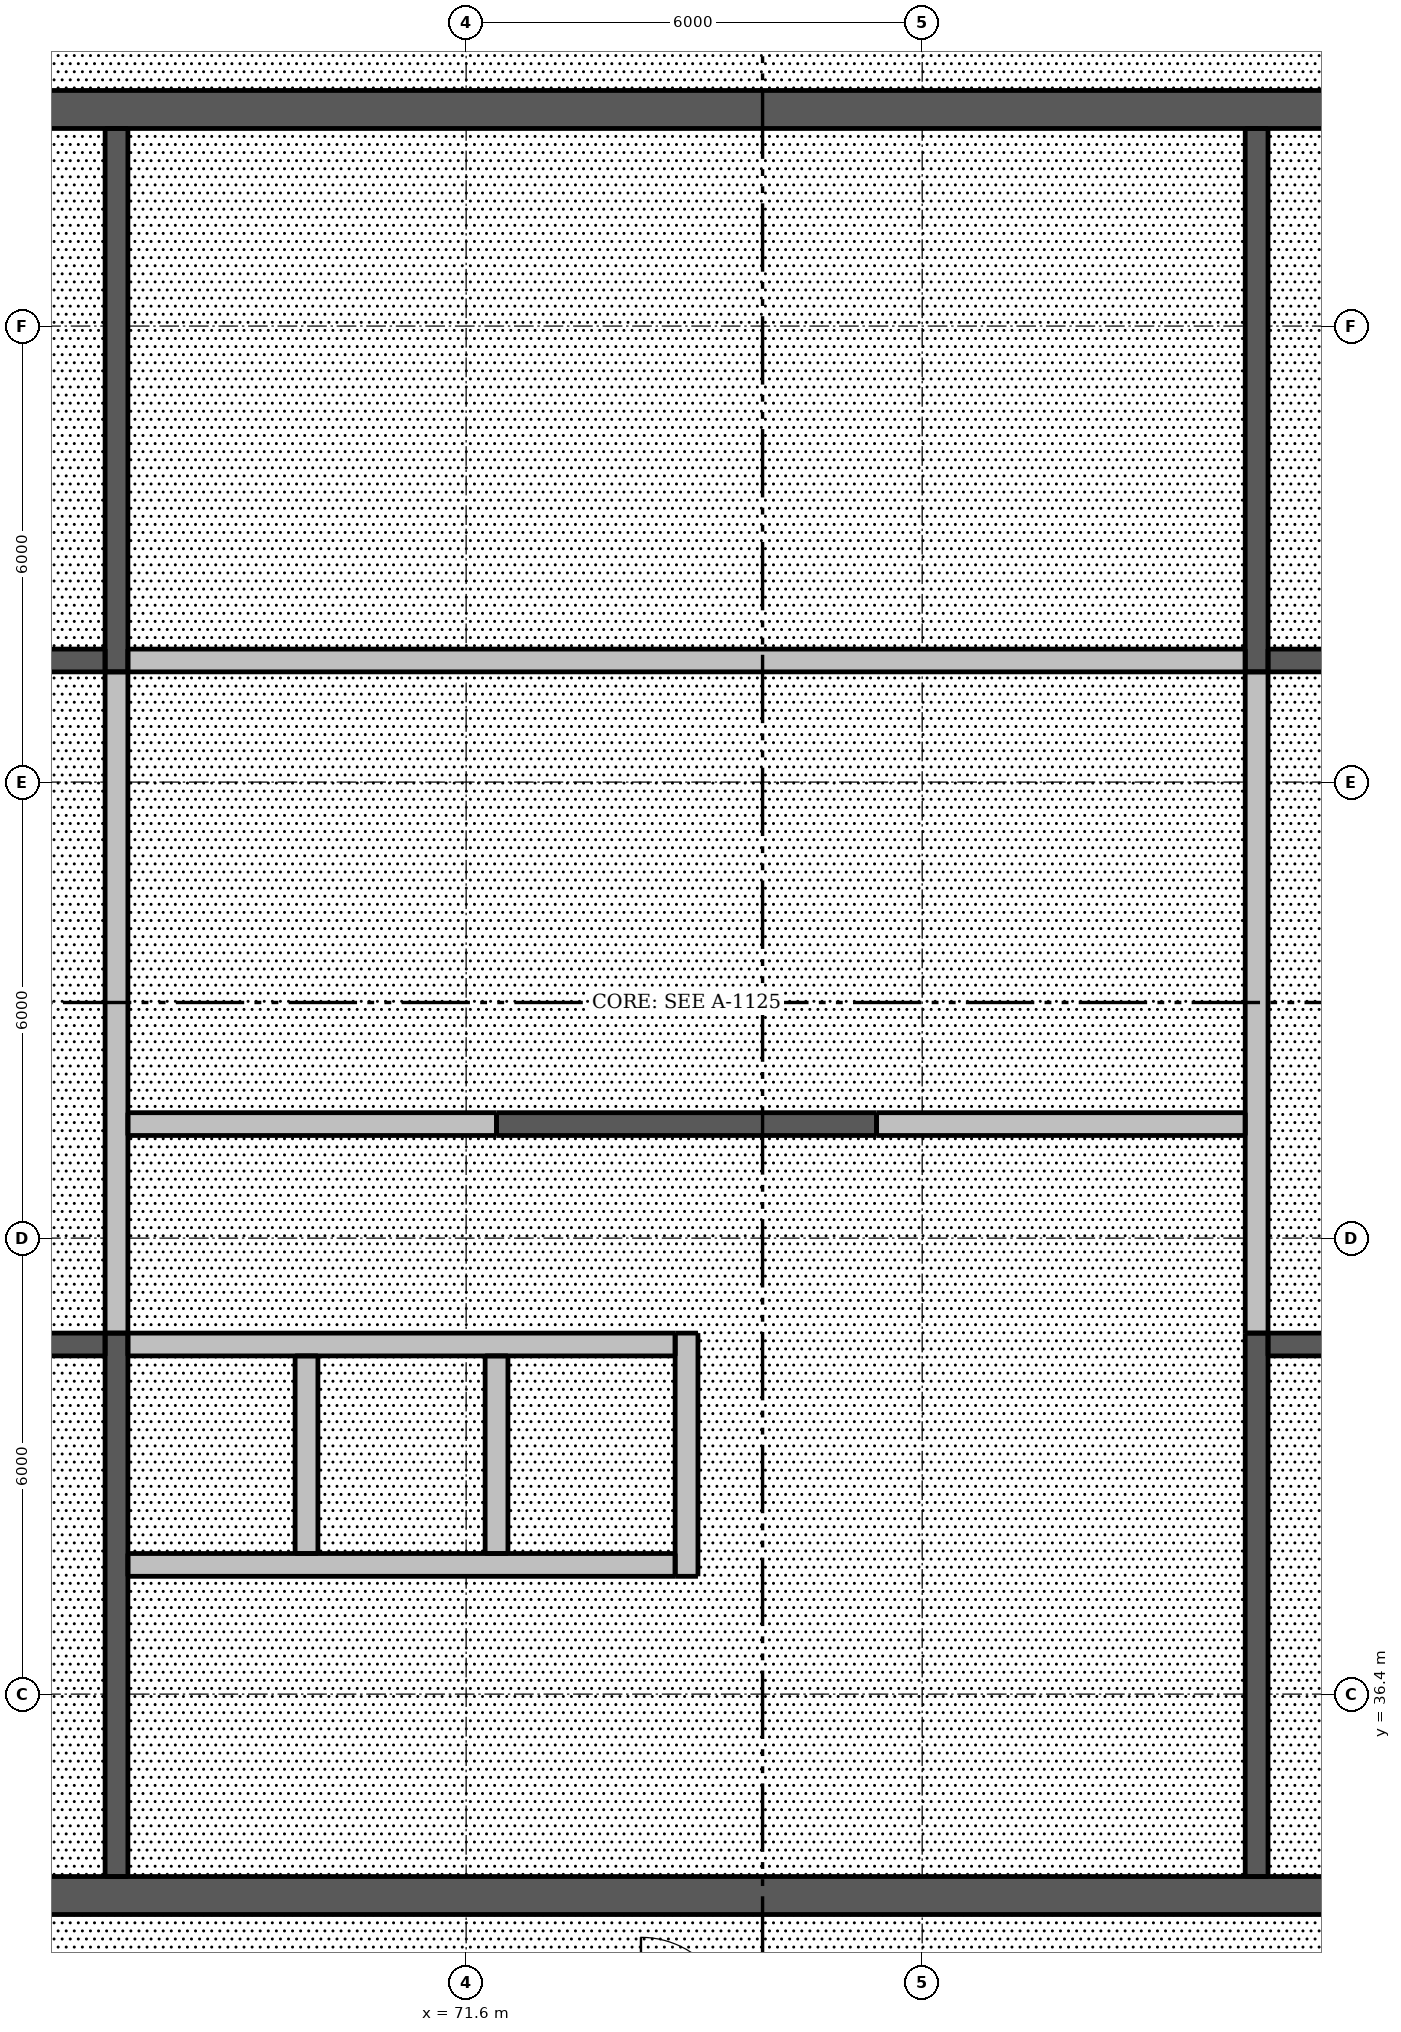
"""IFC4 building model, lengths in metres.
Left out: names, types, materials, properties, quantities, classifications, styles, units other than length and angle.
Written with IfcOpenShell. Run it as: python <this file> out.ifc"""

import sys

from ifc_helpers import new_model, si_unit, direction, frame, frame_2d, origin, place, context, subcontext, project, spatial, rectangle, extrude, element, fill, save


model = new_model("IFC4")
c1 = context("Model", 3, precision=1e-05, world=origin(), true_north=direction((0.0, 1.0)))
c2 = subcontext(c1, "Body", "Model", "MODEL_VIEW")
j1 = project(units=[si_unit("LENGTHUNIT", "METRE"), si_unit("PLANEANGLEUNIT", "RADIAN")], contexts=[c1])
p1 = place(None, origin())
s1 = spatial("IfcSite", under=j1, at=p1, CompositionType="ELEMENT")
p2 = place(p1, origin())
s2 = spatial("IfcBuilding", under=s1, at=p2, CompositionType="ELEMENT")
p3 = place(p2, frame((0.0, 0.0, 294.4)))
s3 = spatial("IfcBuildingStorey", under=s2, at=p3, CompositionType="ELEMENT", Elevation=294.4)
p4 = place(p3, frame((62.5, 33.75, 0.0), z_axis=(0.0, 0.0, 1.0), x_axis=(1.0, 0.0, 0.0)))
e1 = element("IfcWall", 1, at=p4, inside=s3, PredefinedType="SHEAR", context=c2, shape_type="SweptSolid", body=[
    extrude(rectangle(XDim=24.0, YDim=0.5, at=frame_2d((12.0, 0.0))), origin(), (0.0, 0.0, 1.0), 3.3),
])
p5 = place(p4, frame((1.875, 0.0, 0.0)))
e2 = element("IfcOpeningElement", 2, at=p5, cuts=e1, PredefinedType="OPENING", context=c2, shape_type="SweptSolid", body=[
    extrude(rectangle(XDim=1.1, YDim=2.1, at=frame_2d((0.55, 1.05))), frame((0.0, 0.26, 0.0), z_axis=(0.0, -1.0, 0.0), x_axis=(1.0, 0.0, 0.0)), (0.0, 0.0, 1.0), 0.52),
])
p6 = place(p4, frame((21.025, 0.0, 0.0)))
e3 = element("IfcOpeningElement", 3, at=p6, cuts=e1, PredefinedType="OPENING", context=c2, shape_type="SweptSolid", body=[
    extrude(rectangle(XDim=1.1, YDim=2.1, at=frame_2d((0.55, 1.05))), frame((0.0, 0.26, 0.0), z_axis=(0.0, -1.0, 0.0), x_axis=(1.0, 0.0, 0.0)), (0.0, 0.0, 1.0), 0.52),
])
p7 = place(p4, frame((11.55, 0.0, 0.0)))
e4 = element("IfcOpeningElement", 4, at=p7, cuts=e1, PredefinedType="OPENING", context=c2, shape_type="SweptSolid", body=[
    extrude(rectangle(XDim=0.9, YDim=2.1, at=frame_2d((0.45, 1.05))), frame((0.0, 0.26, 0.0), z_axis=(0.0, -1.0, 0.0), x_axis=(1.0, 0.0, 0.0)), (0.0, 0.0, 1.0), 0.52),
])
p8 = place(p3, frame((62.5, 57.25, 0.0), z_axis=(0.0, 0.0, 1.0), x_axis=(1.0, 0.0, 0.0)))
e5 = element("IfcWall", 5, at=p8, inside=s3, PredefinedType="SHEAR", context=c2, shape_type="SweptSolid", body=[
    extrude(rectangle(XDim=24.0, YDim=0.5, at=frame_2d((12.0, 0.0))), origin(), (0.0, 0.0, 1.0), 3.3),
])
p9 = place(p8, frame((21.025, 0.0, 0.0)))
e6 = element("IfcOpeningElement", 6, at=p9, cuts=e5, PredefinedType="OPENING", context=c2, shape_type="SweptSolid", body=[
    extrude(rectangle(XDim=1.1, YDim=2.1, at=frame_2d((0.55, 1.05))), frame((0.0, 0.26, 0.0), z_axis=(0.0, -1.0, 0.0), x_axis=(1.0, 0.0, 0.0)), (0.0, 0.0, 1.0), 0.52),
])
p10 = place(p8, frame((1.875, 0.0, 0.0)))
e7 = element("IfcOpeningElement", 7, at=p10, cuts=e5, PredefinedType="OPENING", context=c2, shape_type="SweptSolid", body=[
    extrude(rectangle(XDim=1.1, YDim=2.1, at=frame_2d((0.55, 1.05))), frame((0.0, 0.26, 0.0), z_axis=(0.0, -1.0, 0.0), x_axis=(1.0, 0.0, 0.0)), (0.0, 0.0, 1.0), 0.52),
])
p11 = place(p8, frame((11.55, 0.0, 0.0)))
e8 = element("IfcOpeningElement", 8, at=p11, cuts=e5, PredefinedType="OPENING", context=c2, shape_type="SweptSolid", body=[
    extrude(rectangle(XDim=0.9, YDim=2.1, at=frame_2d((0.45, 1.05))), frame((0.0, 0.26, 0.0), z_axis=(0.0, -1.0, 0.0), x_axis=(1.0, 0.0, 0.0)), (0.0, 0.0, 1.0), 0.52),
])
p12 = place(p3, frame((72.0, 43.9, 0.0), z_axis=(0.0, 0.0, 1.0), x_axis=(1.0, 0.0, 0.0)))
e9 = element("IfcWall", 9, at=p12, inside=s3, PredefinedType="SHEAR", context=c2, shape_type="SweptSolid", body=[
    extrude(rectangle(XDim=5.0, YDim=0.3, at=frame_2d((2.5, 0.0))), origin(), (0.0, 0.0, 1.0), 3.3),
])
p13 = place(p3, frame((67.0, 34.0, 0.0), z_axis=(0.0, 0.0, 1.0), x_axis=(0.0, 1.0, 0.0)))
e10 = element("IfcWall", 10, at=p13, inside=s3, PredefinedType="SHEAR", context=c2, shape_type="SweptSolid", body=[
    extrude(rectangle(XDim=7.15, YDim=0.3, at=frame_2d((3.575, 0.0))), origin(), (0.0, 0.0, 1.0), 3.3),
])
p14 = place(p13, frame((0.2, 0.0, 0.0)))
e11 = element("IfcOpeningElement", 11, at=p14, cuts=e10, PredefinedType="OPENING", context=c2, shape_type="SweptSolid", body=[
    extrude(rectangle(XDim=1.1, YDim=2.1, at=frame_2d((0.55, 1.05))), frame((0.0, 0.16, 0.0), z_axis=(0.0, -1.0, 0.0), x_axis=(1.0, 0.0, 0.0)), (0.0, 0.0, 1.0), 0.32),
])
p15 = place(p3, frame((67.0, 41.15, 0.0), z_axis=(0.0, 0.0, 1.0), x_axis=(0.0, 1.0, 0.0)))
e12 = element("IfcWall", 12, at=p15, inside=s3, PredefinedType="PARTITIONING", context=c2, shape_type="SweptSolid", body=[
    extrude(rectangle(XDim=8.7, YDim=0.3, at=frame_2d((4.35, 0.0))), origin(), (0.0, 0.0, 1.0), 3.3),
])
p16 = place(p15, frame((3.9, 0.0, 0.0)))
e13 = element("IfcOpeningElement", 13, at=p16, cuts=e12, PredefinedType="OPENING", context=c2, shape_type="SweptSolid", body=[
    extrude(rectangle(XDim=0.9, YDim=2.1, at=frame_2d((0.45, 1.05))), frame((0.0, 0.16, 0.0), z_axis=(0.0, -1.0, 0.0), x_axis=(1.0, 0.0, 0.0)), (0.0, 0.0, 1.0), 0.32),
])
p17 = place(p3, frame((67.0, 49.85, 0.0), z_axis=(0.0, 0.0, 1.0), x_axis=(0.0, 1.0, 0.0)))
e14 = element("IfcWall", 14, at=p17, inside=s3, PredefinedType="SHEAR", context=c2, shape_type="SweptSolid", body=[
    extrude(rectangle(XDim=7.15, YDim=0.3, at=frame_2d((3.575, 0.0))), origin(), (0.0, 0.0, 1.0), 3.3),
])
p18 = place(p17, frame((5.85, 0.0, 0.0)))
e15 = element("IfcOpeningElement", 15, at=p18, cuts=e14, PredefinedType="OPENING", context=c2, shape_type="SweptSolid", body=[
    extrude(rectangle(XDim=1.1, YDim=2.1, at=frame_2d((0.55, 1.05))), frame((0.0, 0.16, 0.0), z_axis=(0.0, -1.0, 0.0), x_axis=(1.0, 0.0, 0.0)), (0.0, 0.0, 1.0), 0.32),
])
p19 = place(p3, frame((82.0, 34.0, 0.0), z_axis=(0.0, 0.0, 1.0), x_axis=(0.0, 1.0, 0.0)))
e16 = element("IfcWall", 16, at=p19, inside=s3, PredefinedType="SHEAR", context=c2, shape_type="SweptSolid", body=[
    extrude(rectangle(XDim=7.15, YDim=0.3, at=frame_2d((3.575, 0.0))), origin(), (0.0, 0.0, 1.0), 3.3),
])
p20 = place(p19, frame((0.2, 0.0, 0.0)))
e17 = element("IfcOpeningElement", 17, at=p20, cuts=e16, PredefinedType="OPENING", context=c2, shape_type="SweptSolid", body=[
    extrude(rectangle(XDim=1.1, YDim=2.1, at=frame_2d((0.55, 1.05))), frame((0.0, 0.16, 0.0), z_axis=(0.0, -1.0, 0.0), x_axis=(1.0, 0.0, 0.0)), (0.0, 0.0, 1.0), 0.32),
])
p21 = place(p3, frame((82.0, 41.15, 0.0), z_axis=(0.0, 0.0, 1.0), x_axis=(0.0, 1.0, 0.0)))
e18 = element("IfcWall", 18, at=p21, inside=s3, PredefinedType="PARTITIONING", context=c2, shape_type="SweptSolid", body=[
    extrude(rectangle(XDim=8.7, YDim=0.3, at=frame_2d((4.35, 0.0))), origin(), (0.0, 0.0, 1.0), 3.3),
])
p22 = place(p21, frame((3.9, 0.0, 0.0)))
e19 = element("IfcOpeningElement", 19, at=p22, cuts=e18, PredefinedType="OPENING", context=c2, shape_type="SweptSolid", body=[
    extrude(rectangle(XDim=0.9, YDim=2.1, at=frame_2d((0.45, 1.05))), frame((0.0, 0.16, 0.0), z_axis=(0.0, -1.0, 0.0), x_axis=(1.0, 0.0, 0.0)), (0.0, 0.0, 1.0), 0.32),
])
p23 = place(p3, frame((82.0, 49.85, 0.0), z_axis=(0.0, 0.0, 1.0), x_axis=(0.0, 1.0, 0.0)))
e20 = element("IfcWall", 20, at=p23, inside=s3, PredefinedType="SHEAR", context=c2, shape_type="SweptSolid", body=[
    extrude(rectangle(XDim=7.15, YDim=0.3, at=frame_2d((3.575, 0.0))), origin(), (0.0, 0.0, 1.0), 3.3),
])
p24 = place(p23, frame((5.85, 0.0, 0.0)))
e21 = element("IfcOpeningElement", 21, at=p24, cuts=e20, PredefinedType="OPENING", context=c2, shape_type="SweptSolid", body=[
    extrude(rectangle(XDim=1.1, YDim=2.1, at=frame_2d((0.55, 1.05))), frame((0.0, 0.16, 0.0), z_axis=(0.0, -1.0, 0.0), x_axis=(1.0, 0.0, 0.0)), (0.0, 0.0, 1.0), 0.32),
])
for number, where, z_axis, x_axis in (
    (22, (63.0, 41.0, 0.0), (0.0, 0.0, 1.0), (1.0, 0.0, 0.0)),
    (23, (82.15, 41.0, 0.0), (0.0, 0.0, 1.0), (1.0, 0.0, 0.0)),
    (24, (63.0, 50.0, 0.0), (0.0, 0.0, 1.0), (1.0, 0.0, 0.0)),
    (25, (82.15, 50.0, 0.0), (0.0, 0.0, 1.0), (1.0, 0.0, 0.0)),
):
    element("IfcWall", number, at=place(p3, frame(where, z_axis=z_axis, x_axis=x_axis)), inside=s3, PredefinedType="SHEAR", context=c2, shape_type="SweptSolid", body=[
        extrude(rectangle(XDim=3.85, YDim=0.3, at=frame_2d((1.925, 0.0))), origin(), (0.0, 0.0, 1.0), 3.3),
    ])
p25 = place(p3, frame((67.15, 50.0, 0.0), z_axis=(0.0, 0.0, 1.0), x_axis=(1.0, 0.0, 0.0)))
e26 = element("IfcWall", 26, at=p25, inside=s3, PredefinedType="PARTITIONING", context=c2, shape_type="SweptSolid", body=[
    extrude(rectangle(XDim=14.7, YDim=0.3, at=frame_2d((7.35, 0.0))), origin(), (0.0, 0.0, 1.0), 3.3),
])
p26 = place(p25, frame((6.9, 0.0, 0.0)))
e27 = element("IfcOpeningElement", 27, at=p26, cuts=e26, PredefinedType="OPENING", context=c2, shape_type="SweptSolid", body=[
    extrude(rectangle(XDim=0.9, YDim=2.1, at=frame_2d((0.45, 1.05))), frame((0.0, 0.16, 0.0), z_axis=(0.0, -1.0, 0.0), x_axis=(1.0, 0.0, 0.0)), (0.0, 0.0, 1.0), 0.32),
])
p27 = place(p3, frame((67.15, 43.9, 0.0), z_axis=(0.0, 0.0, 1.0), x_axis=(1.0, 0.0, 0.0)))
e28 = element("IfcWall", 28, at=p27, inside=s3, PredefinedType="PARTITIONING", context=c2, shape_type="SweptSolid", body=[
    extrude(rectangle(XDim=4.85, YDim=0.3, at=frame_2d((2.425, 0.0))), origin(), (0.0, 0.0, 1.0), 3.3),
])
p28 = place(p27, frame((1.9, 0.0, 0.0)))
e29 = element("IfcOpeningElement", 29, at=p28, cuts=e28, PredefinedType="OPENING", context=c2, shape_type="SweptSolid", body=[
    extrude(rectangle(XDim=0.9, YDim=2.1, at=frame_2d((0.45, 1.05))), frame((0.0, 0.16, 0.0), z_axis=(0.0, -1.0, 0.0), x_axis=(1.0, 0.0, 0.0)), (0.0, 0.0, 1.0), 0.32),
])
p29 = place(p3, frame((77.0, 43.9, 0.0), z_axis=(0.0, 0.0, 1.0), x_axis=(1.0, 0.0, 0.0)))
e30 = element("IfcWall", 30, at=p29, inside=s3, PredefinedType="PARTITIONING", context=c2, shape_type="SweptSolid", body=[
    extrude(rectangle(XDim=4.85, YDim=0.3, at=frame_2d((2.425, 0.0))), origin(), (0.0, 0.0, 1.0), 3.3),
])
p30 = place(p3, frame((67.15, 38.1, 0.0), z_axis=(0.0, 0.0, 1.0), x_axis=(1.0, 0.0, 0.0)))
e31 = element("IfcWall", 31, at=p30, inside=s3, PredefinedType="PARTITIONING", context=c2, shape_type="SweptSolid", body=[
    extrude(rectangle(XDim=7.2, YDim=0.3, at=frame_2d((3.6, 0.0))), origin(), (0.0, 0.0, 1.0), 3.3),
])
p31 = place(p30, frame((0.55, 0.0, 0.0)))
e32 = element("IfcOpeningElement", 32, at=p31, cuts=e31, PredefinedType="OPENING", context=c2, shape_type="SweptSolid", body=[
    extrude(rectangle(XDim=1.1, YDim=2.1, at=frame_2d((0.55, 1.05))), frame((0.0, 0.16, 0.0), z_axis=(0.0, -1.0, 0.0), x_axis=(1.0, 0.0, 0.0)), (0.0, 0.0, 1.0), 0.32),
])
p32 = place(p30, frame((3.05, 0.0, 0.0)))
e33 = element("IfcOpeningElement", 33, at=p32, cuts=e31, PredefinedType="OPENING", context=c2, shape_type="SweptSolid", body=[
    extrude(rectangle(XDim=1.1, YDim=2.1, at=frame_2d((0.55, 1.05))), frame((0.0, 0.16, 0.0), z_axis=(0.0, -1.0, 0.0), x_axis=(1.0, 0.0, 0.0)), (0.0, 0.0, 1.0), 0.32),
])
p33 = place(p30, frame((5.5, 0.0, 0.0)))
e34 = element("IfcOpeningElement", 34, at=p33, cuts=e31, PredefinedType="OPENING", context=c2, shape_type="SweptSolid", body=[
    extrude(rectangle(XDim=1.2, YDim=2.1, at=frame_2d((0.6, 1.05))), frame((0.0, 0.16, 0.0), z_axis=(0.0, -1.0, 0.0), x_axis=(1.0, 0.0, 0.0)), (0.0, 0.0, 1.0), 0.32),
])
p34 = place(p3, frame((67.15, 41.0, 0.0), z_axis=(0.0, 0.0, 1.0), x_axis=(1.0, 0.0, 0.0)))
e35 = element("IfcWall", 35, at=p34, inside=s3, PredefinedType="PARTITIONING", context=c2, shape_type="SweptSolid", body=[
    extrude(rectangle(XDim=7.2, YDim=0.3, at=frame_2d((3.6, 0.0))), origin(), (0.0, 0.0, 1.0), 3.3),
])
for number, where, z_axis, x_axis in (
    (36, (69.5, 38.25, 0.0), (0.0, 0.0, 1.0), (0.0, 1.0, 0.0)),
    (37, (72.0, 38.25, 0.0), (0.0, 0.0, 1.0), (0.0, 1.0, 0.0)),
):
    element("IfcWall", number, at=place(p3, frame(where, z_axis=z_axis, x_axis=x_axis)), inside=s3, PredefinedType="PARTITIONING", context=c2, shape_type="SweptSolid", body=[
        extrude(rectangle(XDim=2.6, YDim=0.3, at=frame_2d((1.3, 0.0))), origin(), (0.0, 0.0, 1.0), 3.3),
    ])
p35 = place(p3, frame((74.5, 37.95, 0.0), z_axis=(0.0, 0.0, 1.0), x_axis=(0.0, 1.0, 0.0)))
e38 = element("IfcWall", 38, at=p35, inside=s3, PredefinedType="PARTITIONING", context=c2, shape_type="SweptSolid", body=[
    extrude(rectangle(XDim=3.2, YDim=0.3, at=frame_2d((1.6, 0.0))), origin(), (0.0, 0.0, 1.0), 3.3),
])
p36 = place(p14, origin())
e39 = element("IfcDoor", 39, at=p36, inside=s3, OperationType="SINGLE_SWING_LEFT", PredefinedType="DOOR", context=c2, shape_type="SweptSolid", body=[
    extrude(rectangle(XDim=1.1, YDim=2.1, at=frame_2d((0.55, 1.05))), frame((0.0, 0.138, 0.0), z_axis=(0.0, -1.0, 0.0), x_axis=(1.0, 0.0, 0.0)), (0.0, 0.0, 1.0), 0.05),
])
fill(e11, e39)
p37 = place(p20, origin())
e40 = element("IfcDoor", 40, at=p37, inside=s3, OperationType="SINGLE_SWING_RIGHT", PredefinedType="DOOR", context=c2, shape_type="SweptSolid", body=[
    extrude(rectangle(XDim=1.1, YDim=2.1, at=frame_2d((0.55, 1.05))), frame((0.0, -0.087, 0.0), z_axis=(0.0, -1.0, 0.0), x_axis=(1.0, 0.0, 0.0)), (0.0, 0.0, 1.0), 0.05),
])
fill(e17, e40)
p38 = place(p18, origin())
e41 = element("IfcDoor", 41, at=p38, inside=s3, OperationType="SINGLE_SWING_LEFT", PredefinedType="DOOR", context=c2, shape_type="SweptSolid", body=[
    extrude(rectangle(XDim=1.1, YDim=2.1, at=frame_2d((0.55, 1.05))), frame((0.0, 0.138, 0.0), z_axis=(0.0, -1.0, 0.0), x_axis=(1.0, 0.0, 0.0)), (0.0, 0.0, 1.0), 0.05),
])
fill(e15, e41)
p39 = place(p24, origin())
e42 = element("IfcDoor", 42, at=p39, inside=s3, OperationType="SINGLE_SWING_RIGHT", PredefinedType="DOOR", context=c2, shape_type="SweptSolid", body=[
    extrude(rectangle(XDim=1.1, YDim=2.1, at=frame_2d((0.55, 1.05))), frame((0.0, -0.087, 0.0), z_axis=(0.0, -1.0, 0.0), x_axis=(1.0, 0.0, 0.0)), (0.0, 0.0, 1.0), 0.05),
])
fill(e21, e42)
p40 = place(p28, origin())
e43 = element("IfcDoor", 43, at=p40, inside=s3, OperationType="SINGLE_SWING_LEFT", PredefinedType="DOOR", context=c2, shape_type="SweptSolid", body=[
    extrude(rectangle(XDim=0.9, YDim=2.1, at=frame_2d((0.45, 1.05))), frame((0.0, 0.138, 0.0), z_axis=(0.0, -1.0, 0.0), x_axis=(1.0, 0.0, 0.0)), (0.0, 0.0, 1.0), 0.05),
])
fill(e29, e43)
p41 = place(p26, origin())
e44 = element("IfcDoor", 44, at=p41, inside=s3, OperationType="SINGLE_SWING_RIGHT", PredefinedType="DOOR", context=c2, shape_type="SweptSolid", body=[
    extrude(rectangle(XDim=0.9, YDim=2.1, at=frame_2d((0.45, 1.05))), frame((0.0, -0.087, 0.0), z_axis=(0.0, -1.0, 0.0), x_axis=(1.0, 0.0, 0.0)), (0.0, 0.0, 1.0), 0.05),
])
fill(e27, e44)
p42 = place(p16, origin())
e45 = element("IfcDoor", 45, at=p42, inside=s3, OperationType="SINGLE_SWING_LEFT", PredefinedType="DOOR", context=c2, shape_type="SweptSolid", body=[
    extrude(rectangle(XDim=0.9, YDim=2.1, at=frame_2d((0.45, 1.05))), frame((0.0, 0.138, 0.0), z_axis=(0.0, -1.0, 0.0), x_axis=(1.0, 0.0, 0.0)), (0.0, 0.0, 1.0), 0.05),
])
fill(e13, e45)
p43 = place(p22, origin())
e46 = element("IfcDoor", 46, at=p43, inside=s3, OperationType="SINGLE_SWING_RIGHT", PredefinedType="DOOR", context=c2, shape_type="SweptSolid", body=[
    extrude(rectangle(XDim=0.9, YDim=2.1, at=frame_2d((0.45, 1.05))), frame((0.0, -0.087, 0.0), z_axis=(0.0, -1.0, 0.0), x_axis=(1.0, 0.0, 0.0)), (0.0, 0.0, 1.0), 0.05),
])
fill(e19, e46)
p44 = place(p7, origin())
e47 = element("IfcDoor", 47, at=p44, inside=s3, OperationType="SINGLE_SWING_LEFT", PredefinedType="DOOR", context=c2, shape_type="SweptSolid", body=[
    extrude(rectangle(XDim=0.9, YDim=2.1, at=frame_2d((0.45, 1.05))), frame((0.0, 0.237, 0.0), z_axis=(0.0, -1.0, 0.0), x_axis=(1.0, 0.0, 0.0)), (0.0, 0.0, 1.0), 0.05),
])
fill(e4, e47)
p45 = place(p11, origin())
e48 = element("IfcDoor", 48, at=p45, inside=s3, OperationType="SINGLE_SWING_RIGHT", PredefinedType="DOOR", context=c2, shape_type="SweptSolid", body=[
    extrude(rectangle(XDim=0.9, YDim=2.1, at=frame_2d((0.45, 1.05))), frame((0.0, -0.188, 0.0), z_axis=(0.0, -1.0, 0.0), x_axis=(1.0, 0.0, 0.0)), (0.0, 0.0, 1.0), 0.05),
])
fill(e8, e48)
p46 = place(p31, origin())
e49 = element("IfcDoor", 49, at=p46, inside=s3, OperationType="DOUBLE_DOOR_SLIDING", PredefinedType="DOOR", context=c2, shape_type="SweptSolid", body=[
    extrude(rectangle(XDim=1.1, YDim=2.1, at=frame_2d((0.55, 1.05))), frame((0.0, 0.025, 0.0), z_axis=(0.0, -1.0, 0.0), x_axis=(1.0, 0.0, 0.0)), (0.0, 0.0, 1.0), 0.05),
])
fill(e32, e49)
p47 = place(p32, origin())
e50 = element("IfcDoor", 50, at=p47, inside=s3, OperationType="DOUBLE_DOOR_SLIDING", PredefinedType="DOOR", context=c2, shape_type="SweptSolid", body=[
    extrude(rectangle(XDim=1.1, YDim=2.1, at=frame_2d((0.55, 1.05))), frame((0.0, 0.025, 0.0), z_axis=(0.0, -1.0, 0.0), x_axis=(1.0, 0.0, 0.0)), (0.0, 0.0, 1.0), 0.05),
])
fill(e33, e50)
p48 = place(p33, origin())
e51 = element("IfcDoor", 51, at=p48, inside=s3, OperationType="DOUBLE_DOOR_SLIDING", PredefinedType="DOOR", context=c2, shape_type="SweptSolid", body=[
    extrude(rectangle(XDim=1.2, YDim=2.1, at=frame_2d((0.6, 1.05))), frame((0.0, 0.025, 0.0), z_axis=(0.0, -1.0, 0.0), x_axis=(1.0, 0.0, 0.0)), (0.0, 0.0, 1.0), 0.05),
])
fill(e34, e51)
save(model, sys.argv[1])
